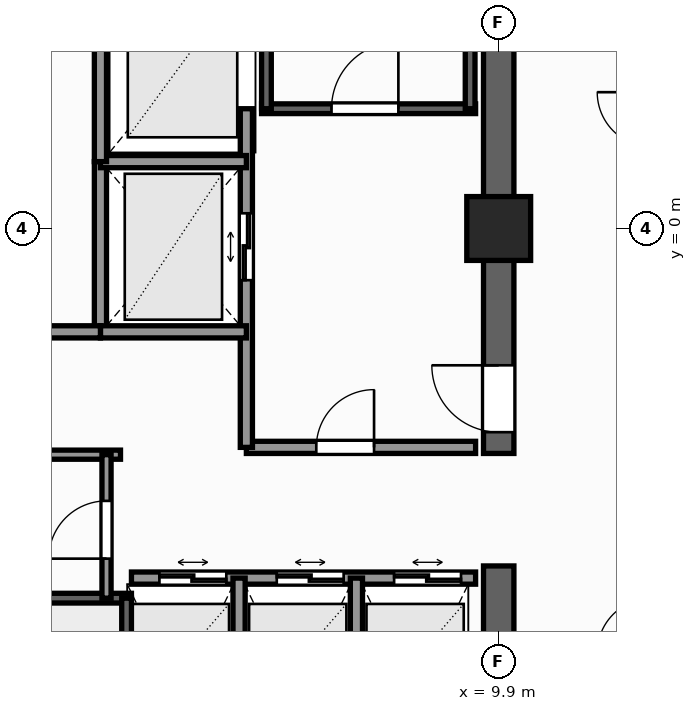
"""IFC4 building model, lengths in metres.
Left out: names, types, materials, properties, quantities, classifications, styles, units other than length and angle.
Written with IfcOpenShell. Run it as: python <this file> out.ifc"""

import sys

from ifc_helpers import new_model, si_unit, direction, frame, frame_2d, origin, origin_2d, place, context, subcontext, project, spatial, rectangle, extrude, element, fill, save


model = new_model("IFC4")
c1 = context("Model", 3, precision=1e-05, world=origin(), true_north=direction((0.0, 1.0)))
c2 = subcontext(c1, "Body", "Model", "MODEL_VIEW")
j1 = project(units=[si_unit("LENGTHUNIT", "METRE"), si_unit("PLANEANGLEUNIT", "RADIAN")], contexts=[c1])
p1 = place(None, origin())
s1 = spatial("IfcSite", under=j1, at=p1, CompositionType="ELEMENT")
p2 = place(p1, origin())
s2 = spatial("IfcBuilding", under=s1, at=p2, CompositionType="ELEMENT")
p3 = place(p2, frame((0.0, 0.0, 199.8)))
s3 = spatial("IfcBuildingStorey", under=s2, at=p3, CompositionType="ELEMENT", Elevation=199.8)
p4 = place(p3, frame((9.9, -9.65, 0.0), z_axis=(0.0, 0.0, 1.0), x_axis=(0.0, 1.0, 0.0)))
e1 = element("IfcWall", 1, at=p4, inside=s3, PredefinedType="SHEAR", context=c2, shape_type="SweptSolid", body=[
    extrude(rectangle(XDim=4.1, YDim=0.5, at=frame_2d((2.05, 0.0))), origin(), (0.0, 0.0, 1.0), 3.3),
])
p5 = place(p3, frame((9.9, -3.7, 0.0), z_axis=(0.0, 0.0, 1.0), x_axis=(0.0, 1.0, 0.0)))
e2 = element("IfcWall", 2, at=p5, inside=s3, PredefinedType="SHEAR", context=c2, shape_type="SweptSolid", body=[
    extrude(rectangle(XDim=13.35, YDim=0.5, at=frame_2d((6.675, 0.0))), origin(), (0.0, 0.0, 1.0), 3.3),
])
p6 = place(p5, frame((0.35, 0.0, 0.0)))
e3 = element("IfcOpeningElement", 3, at=p6, cuts=e2, PredefinedType="OPENING", context=c2, shape_type="SweptSolid", body=[
    extrude(rectangle(XDim=1.1, YDim=2.2, at=frame_2d((0.55, 1.1))), frame((0.0, 0.26, 0.0), z_axis=(0.0, -1.0, 0.0), x_axis=(1.0, 0.0, 0.0)), (0.0, 0.0, 1.0), 0.52),
])
p7 = place(p3, frame((9.9, 0.0, 0.0), z_axis=(0.0, 0.0, 1.0), x_axis=(1.0, 0.0, 0.0)))
e4 = element("IfcColumn", 4, at=p7, inside=s3, PredefinedType="COLUMN", context=c2, shape_type="SweptSolid", body=[
    extrude(rectangle(XDim=1.05, YDim=1.05, at=origin_2d()), origin(), (0.0, 0.0, 1.0), 3.3),
])
p8 = place(p3, frame((6.0, 1.97, 0.0), z_axis=(0.0, 0.0, 1.0), x_axis=(1.0, 0.0, 0.0)))
e5 = element("IfcWall", 5, at=p8, inside=s3, PredefinedType="SHEAR", context=c2, shape_type="SweptSolid", body=[
    extrude(rectangle(XDim=3.52, YDim=0.16, at=frame_2d((1.76, 0.0))), origin(), (0.0, 0.0, 1.0), 3.3),
])
p9 = place(p8, frame((1.15, 0.0, 0.0)))
e6 = element("IfcOpeningElement", 6, at=p9, cuts=e5, PredefinedType="OPENING", context=c2, shape_type="SweptSolid", body=[
    extrude(rectangle(XDim=1.1, YDim=2.2, at=frame_2d((0.55, 1.1))), frame((0.0, 0.09, 0.0), z_axis=(0.0, -1.0, 0.0), x_axis=(1.0, 0.0, 0.0)), (0.0, 0.0, 1.0), 0.18),
])
for number, where, z_axis, x_axis in (
    (7, (6.08, 1.97, 0.0), (0.0, 0.0, 1.0), (0.0, 1.0, 0.0)),
    (8, (9.43, 1.97, 0.0), (0.0, 0.0, 1.0), (0.0, 1.0, 0.0)),
):
    element("IfcWall", number, at=place(p3, frame(where, z_axis=z_axis, x_axis=x_axis)), inside=s3, PredefinedType="SHEAR", context=c2, shape_type="SweptSolid", body=[
        extrude(rectangle(XDim=7.56, YDim=0.16, at=frame_2d((3.78, 0.0))), origin(), (0.0, 0.0, 1.0), 3.3),
    ])
p10 = place(p3, frame((-3.86, -6.08, 0.0), z_axis=(0.0, 0.0, 1.0), x_axis=(1.0, 0.0, 0.0)))
e9 = element("IfcWall", 9, at=p10, inside=s3, PredefinedType="SHEAR", context=c2, shape_type="SweptSolid", body=[
    extrude(rectangle(XDim=7.72, YDim=0.16, at=frame_2d((3.86, 0.0))), origin(), (0.0, 0.0, 1.0), 3.3),
])
p11 = place(p3, frame((3.78, -9.43, 0.0), z_axis=(0.0, 0.0, 1.0), x_axis=(0.0, 1.0, 0.0)))
e10 = element("IfcWall", 10, at=p11, inside=s3, PredefinedType="SHEAR", context=c2, shape_type="SweptSolid", body=[
    extrude(rectangle(XDim=3.35, YDim=0.16, at=frame_2d((1.675, 0.0))), origin(), (0.0, 0.0, 1.0), 3.3),
])
p12 = place(p3, frame((5.75, -3.6, 0.0), z_axis=(0.0, 0.0, 1.0), x_axis=(1.0, 0.0, 0.0)))
e11 = element("IfcWall", 11, at=p12, inside=s3, PredefinedType="SOLIDWALL", context=c2, shape_type="SweptSolid", body=[
    extrude(rectangle(XDim=3.77, YDim=0.2, at=frame_2d((1.885, 0.0))), origin(), (0.0, 0.0, 1.0), 3.08),
])
p13 = place(p12, frame((1.15, 0.0, 0.0)))
e12 = element("IfcOpeningElement", 12, at=p13, cuts=e11, PredefinedType="OPENING", context=c2, shape_type="SweptSolid", body=[
    extrude(rectangle(XDim=0.95, YDim=2.06, at=frame_2d((0.475, 1.03))), frame((0.0, 0.11, 0.0), z_axis=(0.0, -1.0, 0.0), x_axis=(1.0, 0.0, 0.0)), (0.0, 0.0, 1.0), 0.22),
])
p14 = place(p3, frame((5.75, -3.6, 0.0), z_axis=(0.0, 0.0, 1.0), x_axis=(0.0, 1.0, 0.0)))
e13 = element("IfcWall", 13, at=p14, inside=s3, PredefinedType="SOLIDWALL", context=c2, shape_type="SweptSolid", body=[
    extrude(rectangle(XDim=5.57, YDim=0.2, at=frame_2d((2.785, 0.0))), origin(), (0.0, 0.0, 1.0), 3.08),
])
p15 = place(p14, frame((2.75, 0.0, 0.0)))
e14 = element("IfcOpeningElement", 14, at=p15, cuts=e13, PredefinedType="OPENING", context=c2, shape_type="SweptSolid", body=[
    extrude(rectangle(XDim=1.1, YDim=2.2, at=frame_2d((0.55, 1.1))), frame((0.0, 0.11, 0.0), z_axis=(0.0, -1.0, 0.0), x_axis=(1.0, 0.0, 0.0)), (0.0, 0.0, 1.0), 0.22),
])
p16 = place(p3, frame((3.35, -1.7, 0.0), z_axis=(0.0, 0.0, 1.0), x_axis=(0.0, 1.0, 0.0)))
e15 = element("IfcWall", 15, at=p16, inside=s3, PredefinedType="SOLIDWALL", context=c2, shape_type="SweptSolid", body=[
    extrude(rectangle(XDim=2.8, YDim=0.2, at=frame_2d((1.4, 0.0))), origin(), (0.0, 0.0, 1.0), 3.08),
])
for number, where, z_axis, x_axis in (
    (16, (3.35, -1.7, 0.0), (0.0, 0.0, 1.0), (1.0, 0.0, 0.0)),
    (17, (3.35, 1.1, 0.0), (0.0, 0.0, 1.0), (1.0, 0.0, 0.0)),
):
    element("IfcWall", number, at=place(p3, frame(where, z_axis=z_axis, x_axis=x_axis)), inside=s3, PredefinedType="SOLIDWALL", context=c2, shape_type="SweptSolid", body=[
        extrude(rectangle(XDim=2.4, YDim=0.2, at=frame_2d((1.2, 0.0))), origin(), (0.0, 0.0, 1.0), 3.08),
    ])
p17 = place(p3, frame((3.86, -5.75, 0.0), z_axis=(0.0, 0.0, 1.0), x_axis=(1.0, 0.0, 0.0)))
e18 = element("IfcWall", 18, at=p17, inside=s3, PredefinedType="SOLIDWALL", context=c2, shape_type="SweptSolid", body=[
    extrude(rectangle(XDim=5.66, YDim=0.2, at=frame_2d((2.83, 0.0))), origin(), (0.0, 0.0, 1.0), 3.08),
])
p18 = place(p17, frame((0.46, 0.0, 0.0)))
e19 = element("IfcOpeningElement", 19, at=p18, cuts=e18, PredefinedType="OPENING", context=c2, shape_type="SweptSolid", body=[
    extrude(rectangle(XDim=1.1, YDim=2.2, at=frame_2d((0.55, 1.1))), frame((0.0, 0.11, 0.0), z_axis=(0.0, -1.0, 0.0), x_axis=(1.0, 0.0, 0.0)), (0.0, 0.0, 1.0), 0.22),
])
p19 = place(p17, frame((2.39, 0.0, 0.0)))
e20 = element("IfcOpeningElement", 20, at=p19, cuts=e18, PredefinedType="OPENING", context=c2, shape_type="SweptSolid", body=[
    extrude(rectangle(XDim=1.1, YDim=2.2, at=frame_2d((0.55, 1.1))), frame((0.0, 0.11, 0.0), z_axis=(0.0, -1.0, 0.0), x_axis=(1.0, 0.0, 0.0)), (0.0, 0.0, 1.0), 0.22),
])
p20 = place(p17, frame((4.32, 0.0, 0.0)))
e21 = element("IfcOpeningElement", 21, at=p20, cuts=e18, PredefinedType="OPENING", context=c2, shape_type="SweptSolid", body=[
    extrude(rectangle(XDim=1.1, YDim=2.2, at=frame_2d((0.55, 1.1))), frame((0.0, 0.11, 0.0), z_axis=(0.0, -1.0, 0.0), x_axis=(1.0, 0.0, 0.0)), (0.0, 0.0, 1.0), 0.22),
])
for number, where, z_axis, x_axis in (
    (22, (5.63, -9.52, 0.0), (0.0, 0.0, 1.0), (0.0, 1.0, 0.0)),
    (23, (7.56, -9.52, 0.0), (0.0, 0.0, 1.0), (0.0, 1.0, 0.0)),
):
    element("IfcWall", number, at=place(p3, frame(where, z_axis=z_axis, x_axis=x_axis)), inside=s3, PredefinedType="SOLIDWALL", context=c2, shape_type="SweptSolid", body=[
        extrude(rectangle(XDim=3.77, YDim=0.2, at=frame_2d((1.885, 0.0))), origin(), (0.0, 0.0, 1.0), 3.08),
    ])
p21 = place(p3, frame((-3.35, -1.7, 0.0), z_axis=(0.0, 0.0, 1.0), x_axis=(1.0, 0.0, 0.0)))
e24 = element("IfcWall", 24, at=p21, inside=s3, PredefinedType="SOLIDWALL", context=c2, shape_type="SweptSolid", body=[
    extrude(rectangle(XDim=6.7, YDim=0.2, at=frame_2d((3.35, 0.0))), origin(), (0.0, 0.0, 1.0), 3.08),
])
p22 = place(p3, frame((3.35, 1.1, 0.0), z_axis=(0.0, 0.0, 1.0), x_axis=(0.0, 1.0, 0.0)))
e25 = element("IfcWall", 25, at=p22, inside=s3, PredefinedType="SOLIDWALL", context=c2, shape_type="SweptSolid", body=[
    extrude(rectangle(XDim=3.2, YDim=0.2, at=frame_2d((1.6, 0.0))), origin(), (0.0, 0.0, 1.0), 3.08),
])
p23 = place(p3, frame((-3.68, -3.72, 0.0), z_axis=(0.0, 0.0, 1.0), x_axis=(1.0, 0.0, 0.0)))
e26 = element("IfcWall", 26, at=p23, inside=s3, PredefinedType="PARTITIONING", context=c2, shape_type="SweptSolid", body=[
    extrude(rectangle(XDim=7.36, YDim=0.15, at=frame_2d((3.68, 0.0))), origin(), (0.0, 0.0, 1.0), 3.08),
])
p24 = place(p3, frame((3.45, -6.08, 0.0), z_axis=(0.0, 0.0, 1.0), x_axis=(0.0, 1.0, 0.0)))
e27 = element("IfcWall", 27, at=p24, inside=s3, PredefinedType="PARTITIONING", context=c2, shape_type="SweptSolid", body=[
    extrude(rectangle(XDim=2.36, YDim=0.15, at=frame_2d((1.18, 0.0))), origin(), (0.0, 0.0, 1.0), 3.08),
])
p25 = place(p24, frame((0.65, 0.0, 0.0)))
e28 = element("IfcOpeningElement", 28, at=p25, cuts=e27, PredefinedType="OPENING", context=c2, shape_type="SweptSolid", body=[
    extrude(rectangle(XDim=0.95, YDim=2.06, at=frame_2d((0.475, 1.03))), frame((0.0, 0.085, 0.0), z_axis=(0.0, -1.0, 0.0), x_axis=(1.0, 0.0, 0.0)), (0.0, 0.0, 1.0), 0.17),
])
p26 = place(p9, origin())
e29 = element("IfcDoor", 29, at=p26, inside=s3, OperationType="SINGLE_SWING_RIGHT", PredefinedType="DOOR", context=c2, shape_type="SweptSolid", body=[
    extrude(rectangle(XDim=1.1, YDim=2.2, at=frame_2d((0.55, 1.1))), frame((0.0, 0.025, 0.0), z_axis=(0.0, -1.0, 0.0), x_axis=(1.0, 0.0, 0.0)), (0.0, 0.0, 1.0), 0.05),
])
fill(e6, e29)
p27 = place(p6, origin())
e30 = element("IfcDoor", 30, at=p27, inside=s3, OperationType="SINGLE_SWING_RIGHT", PredefinedType="DOOR", context=c2, shape_type="SweptSolid", body=[
    extrude(rectangle(XDim=1.1, YDim=2.2, at=frame_2d((0.55, 1.1))), frame((0.0, 0.025, 0.0), z_axis=(0.0, -1.0, 0.0), x_axis=(1.0, 0.0, 0.0)), (0.0, 0.0, 1.0), 0.05),
])
fill(e3, e30)
p28 = place(p15, origin())
e31 = element("IfcDoor", 31, at=p28, inside=s3, OperationType="DOUBLE_DOOR_SLIDING", PredefinedType="DOOR", context=c2, shape_type="SweptSolid", body=[
    extrude(rectangle(XDim=1.1, YDim=2.2, at=frame_2d((0.55, 1.1))), frame((0.0, 0.025, 0.0), z_axis=(0.0, -1.0, 0.0), x_axis=(1.0, 0.0, 0.0)), (0.0, 0.0, 1.0), 0.05),
])
fill(e14, e31)
p29 = place(p18, origin())
e32 = element("IfcDoor", 32, at=p29, inside=s3, OperationType="DOUBLE_DOOR_SLIDING", PredefinedType="DOOR", context=c2, shape_type="SweptSolid", body=[
    extrude(rectangle(XDim=1.1, YDim=2.2, at=frame_2d((0.55, 1.1))), frame((0.0, 0.025, 0.0), z_axis=(0.0, -1.0, 0.0), x_axis=(1.0, 0.0, 0.0)), (0.0, 0.0, 1.0), 0.05),
])
fill(e19, e32)
p30 = place(p19, origin())
e33 = element("IfcDoor", 33, at=p30, inside=s3, OperationType="DOUBLE_DOOR_SLIDING", PredefinedType="DOOR", context=c2, shape_type="SweptSolid", body=[
    extrude(rectangle(XDim=1.1, YDim=2.2, at=frame_2d((0.55, 1.1))), frame((0.0, 0.025, 0.0), z_axis=(0.0, -1.0, 0.0), x_axis=(1.0, 0.0, 0.0)), (0.0, 0.0, 1.0), 0.05),
])
fill(e20, e33)
p31 = place(p20, origin())
e34 = element("IfcDoor", 34, at=p31, inside=s3, OperationType="DOUBLE_DOOR_SLIDING", PredefinedType="DOOR", context=c2, shape_type="SweptSolid", body=[
    extrude(rectangle(XDim=1.1, YDim=2.2, at=frame_2d((0.55, 1.1))), frame((0.0, 0.025, 0.0), z_axis=(0.0, -1.0, 0.0), x_axis=(1.0, 0.0, 0.0)), (0.0, 0.0, 1.0), 0.05),
])
fill(e21, e34)
p32 = place(p13, origin())
e35 = element("IfcDoor", 35, at=p32, inside=s3, OperationType="SINGLE_SWING_RIGHT", PredefinedType="DOOR", context=c2, shape_type="SweptSolid", body=[
    extrude(rectangle(XDim=0.95, YDim=2.06, at=frame_2d((0.475, 1.03))), frame((0.0, 0.025, 0.0), z_axis=(0.0, -1.0, 0.0), x_axis=(1.0, 0.0, 0.0)), (0.0, 0.0, 1.0), 0.05),
])
fill(e12, e35)
p33 = place(p25, origin())
e36 = element("IfcDoor", 36, at=p33, inside=s3, OperationType="SINGLE_SWING_LEFT", PredefinedType="DOOR", context=c2, shape_type="SweptSolid", body=[
    extrude(rectangle(XDim=0.95, YDim=2.06, at=frame_2d((0.475, 1.03))), frame((0.0, 0.025, 0.0), z_axis=(0.0, -1.0, 0.0), x_axis=(1.0, 0.0, 0.0)), (0.0, 0.0, 1.0), 0.05),
])
fill(e28, e36)
save(model, sys.argv[1])
